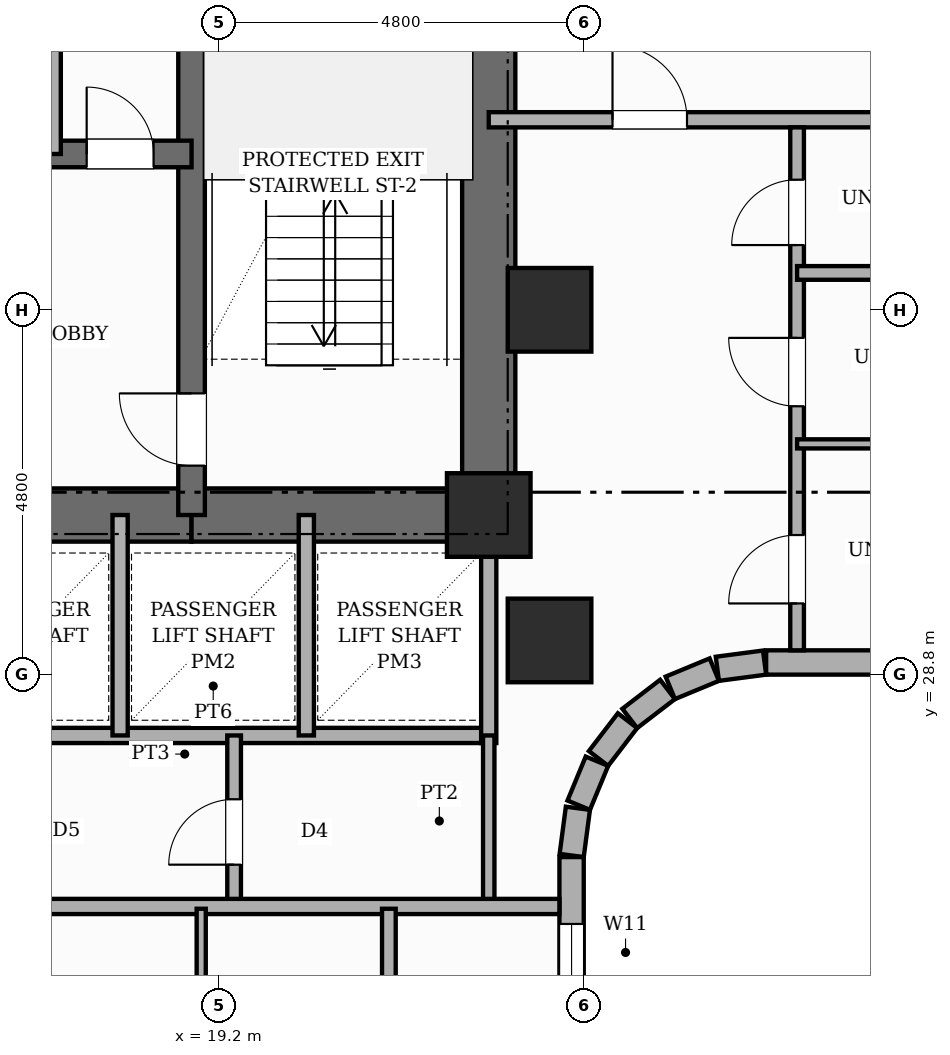
"""IFC4 building model, lengths in metres.
Left out: names, types, materials, properties, quantities, classifications, styles, units other than length and angle.
Written with IfcOpenShell. Run it as: python <this file> out.ifc"""

import sys

from ifc_helpers import new_model, si_unit, direction, frame, frame_2d, origin, origin_2d, place, context, subcontext, project, spatial, rectangle, extrude, element, fill, save


model = new_model("IFC4")
c1 = context("Model", 3, precision=1e-05, world=origin(), true_north=direction((0.0, 1.0)))
c2 = subcontext(c1, "Body", "Model", "MODEL_VIEW")
j1 = project(units=[si_unit("LENGTHUNIT", "METRE"), si_unit("PLANEANGLEUNIT", "RADIAN")], contexts=[c1])
p1 = place(None, origin())
s1 = spatial("IfcSite", under=j1, at=p1, CompositionType="ELEMENT")
p2 = place(p1, origin())
s2 = spatial("IfcBuilding", under=s1, at=p2, CompositionType="ELEMENT")
p3 = place(p2, frame((0.0, 0.0, 25.0)))
s3 = spatial("IfcBuildingStorey", under=s2, at=p3, CompositionType="ELEMENT", Elevation=25.0)
p4 = place(p3, frame((22.75, 30.55, 0.0), z_axis=(0.0, 0.0, 1.0), x_axis=(0.0, 1.0, 0.0)))
e1 = element("IfcWall", 1, at=p4, inside=s3, PredefinedType="SHEAR", context=c2, shape_type="SweptSolid", body=[
    extrude(rectangle(XDim=15.6, YDim=0.7, at=frame_2d((7.8, 0.0))), origin(), (0.0, 0.0, 1.0), 3.6),
])
p5 = place(p4, frame((10.8, 0.0, 0.0)))
e2 = element("IfcOpeningElement", 2, at=p5, cuts=e1, PredefinedType="OPENING", context=c2, shape_type="SweptSolid", body=[
    extrude(rectangle(XDim=1.0, YDim=2.15, at=frame_2d((0.5, 1.075))), frame((0.0, 0.36, 0.0), z_axis=(0.0, -1.0, 0.0), x_axis=(1.0, 0.0, 0.0)), (0.0, 0.0, 1.0), 0.72),
])
p6 = place(p3, frame((9.96, 30.9, 0.0), z_axis=(0.0, 0.0, 1.0), x_axis=(1.0, 0.0, 0.0)))
e3 = element("IfcWall", 3, at=p6, inside=s3, PredefinedType="SHEAR", context=c2, shape_type="SweptSolid", body=[
    extrude(rectangle(XDim=8.88, YDim=0.7, at=frame_2d((4.44, 0.0))), origin(), (0.0, 0.0, 1.0), 3.6),
])
p7 = place(p6, frame((4.09, 0.0, 0.0)))
e4 = element("IfcOpeningElement", 4, at=p7, cuts=e3, PredefinedType="OPENING", context=c2, shape_type="SweptSolid", body=[
    extrude(rectangle(XDim=1.0, YDim=2.15, at=frame_2d((0.5, 1.075))), frame((0.0, 0.36, 0.0), z_axis=(0.0, -1.0, 0.0), x_axis=(1.0, 0.0, 0.0)), (0.0, 0.0, 1.0), 0.72),
])
p8 = place(p3, frame((18.84, 30.9, 0.0), z_axis=(0.0, 0.0, 1.0), x_axis=(1.0, 0.0, 0.0)))
e5 = element("IfcWall", 5, at=p8, inside=s3, PredefinedType="SHEAR", context=c2, shape_type="SweptSolid", body=[
    extrude(rectangle(XDim=3.91, YDim=0.7, at=frame_2d((1.955, 0.0))), origin(), (0.0, 0.0, 1.0), 3.6),
])
p9 = place(p3, frame((18.84, 30.9, 0.0), z_axis=(0.0, 0.0, 1.0), x_axis=(0.0, 1.0, 0.0)))
e6 = element("IfcWall", 6, at=p9, inside=s3, PredefinedType="SHEAR", context=c2, shape_type="SweptSolid", body=[
    extrude(rectangle(XDim=14.9, YDim=0.35, at=frame_2d((7.45, 0.0))), origin(), (0.0, 0.0, 1.0), 3.6),
])
p10 = place(p9, frame((0.65, 0.0, 0.0)))
e7 = element("IfcOpeningElement", 7, at=p10, cuts=e6, PredefinedType="OPENING", context=c2, shape_type="SweptSolid", body=[
    extrude(rectangle(XDim=0.95, YDim=2.1, at=frame_2d((0.475, 1.05))), frame((0.0, 0.185, 0.0), z_axis=(0.0, -1.0, 0.0), x_axis=(1.0, 0.0, 0.0)), (0.0, 0.0, 1.0), 0.37),
])
p11 = place(p9, frame((10.45, 0.0, 0.0)))
e8 = element("IfcOpeningElement", 8, at=p11, cuts=e6, PredefinedType="OPENING", context=c2, shape_type="SweptSolid", body=[
    extrude(rectangle(XDim=1.0, YDim=2.15, at=frame_2d((0.5, 1.075))), frame((0.0, 0.185, 0.0), z_axis=(0.0, -1.0, 0.0), x_axis=(1.0, 0.0, 0.0)), (0.0, 0.0, 1.0), 0.37),
])
p12 = place(p3, frame((9.96, 35.65, 0.0), z_axis=(0.0, 0.0, 1.0), x_axis=(1.0, 0.0, 0.0)))
e9 = element("IfcWall", 9, at=p12, inside=s3, PredefinedType="SHEAR", context=c2, shape_type="SweptSolid", body=[
    extrude(rectangle(XDim=8.88, YDim=0.35, at=frame_2d((4.44, 0.0))), origin(), (0.0, 0.0, 1.0), 3.6),
])
p13 = place(p12, frame((0.84, 0.0, 0.0)))
e10 = element("IfcOpeningElement", 10, at=p13, cuts=e9, PredefinedType="OPENING", context=c2, shape_type="SweptSolid", body=[
    extrude(rectangle(XDim=1.1, YDim=2.15, at=frame_2d((0.55, 1.075))), frame((0.0, 0.185, 0.0), z_axis=(0.0, -1.0, 0.0), x_axis=(1.0, 0.0, 0.0)), (0.0, 0.0, 1.0), 0.37),
])
p14 = place(p12, frame((5.24, 0.0, 0.0)))
e11 = element("IfcOpeningElement", 11, at=p14, cuts=e9, PredefinedType="OPENING", context=c2, shape_type="SweptSolid", body=[
    extrude(rectangle(XDim=1.1, YDim=2.15, at=frame_2d((0.55, 1.075))), frame((0.0, 0.185, 0.0), z_axis=(0.0, -1.0, 0.0), x_axis=(1.0, 0.0, 0.0)), (0.0, 0.0, 1.0), 0.37),
])
p15 = place(p12, frame((7.5, 0.0, 0.0)))
e12 = element("IfcOpeningElement", 12, at=p15, cuts=e9, PredefinedType="OPENING", context=c2, shape_type="SweptSolid", body=[
    extrude(rectangle(XDim=0.88, YDim=2.1, at=frame_2d((0.44, 1.05))), frame((0.0, 0.185, 0.0), z_axis=(0.0, -1.0, 0.0), x_axis=(1.0, 0.0, 0.0)), (0.0, 0.0, 1.0), 0.37),
])
for number, where, z_axis, x_axis in (
    (13, (22.75, 30.9, 0.0), (0.0, 0.0, 1.0), (1.0, 0.0, 0.0)),
    (14, (23.55, 29.25, 0.0), (0.0, 0.0, 1.0), (1.0, 0.0, 0.0)),
    (15, (23.55, 33.6, 0.0), (0.0, 0.0, 1.0), (1.0, 0.0, 0.0)),
):
    element("IfcColumn", number, at=place(p3, frame(where, z_axis=z_axis, x_axis=x_axis)), inside=s3, PredefinedType="COLUMN", context=c2, shape_type="SweptSolid", body=[
        extrude(rectangle(XDim=1.1, YDim=1.1, at=origin_2d()), origin(), (0.0, 0.0, 1.0), 3.6),
    ])
p16 = place(p3, frame((55.2, 28.96, 0.0), z_axis=(0.0, 0.0, 1.0), x_axis=(-1.0, 0.0, 0.0)))
e16 = element("IfcWall", 16, at=p16, inside=s3, PredefinedType="STANDARD", context=c2, shape_type="SweptSolid", body=[
    extrude(rectangle(XDim=28.8, YDim=0.32, at=frame_2d((14.4, 0.0))), origin(), (0.0, 0.0, 1.0), 2.53),
])
p17 = place(p16, frame((24.115, 0.0, 0.65)))
e17 = element("IfcOpeningElement", 17, at=p17, cuts=e16, PredefinedType="OPENING", context=c2, shape_type="SweptSolid", body=[
    extrude(rectangle(XDim=1.4, YDim=1.1, at=frame_2d((0.7, 0.55))), frame((0.0, 0.17, 0.0), z_axis=(0.0, -1.0, 0.0), x_axis=(1.0, 0.0, 0.0)), (0.0, 0.0, 1.0), 0.34),
])
p18 = place(p16, frame((12.991, 0.0, 0.65)))
e18 = element("IfcOpeningElement", 18, at=p18, cuts=e16, PredefinedType="OPENING", context=c2, shape_type="SweptSolid", body=[
    extrude(rectangle(XDim=1.4, YDim=1.1, at=frame_2d((0.7, 0.55))), frame((0.0, 0.17, 0.0), z_axis=(0.0, -1.0, 0.0), x_axis=(1.0, 0.0, 0.0)), (0.0, 0.0, 1.0), 0.34),
])
p19 = place(p16, frame((19.869, 0.0, 0.45)))
e19 = element("IfcOpeningElement", 19, at=p19, cuts=e16, PredefinedType="OPENING", context=c2, shape_type="SweptSolid", body=[
    extrude(rectangle(XDim=0.95, YDim=1.8, at=frame_2d((0.475, 0.9))), frame((0.0, 0.17, 0.0), z_axis=(0.0, -1.0, 0.0), x_axis=(1.0, 0.0, 0.0)), (0.0, 0.0, 1.0), 0.34),
])
p20 = place(p16, frame((4.79, 0.0, 0.65)))
e20 = element("IfcOpeningElement", 20, at=p20, cuts=e16, PredefinedType="OPENING", context=c2, shape_type="SweptSolid", body=[
    extrude(rectangle(XDim=1.4, YDim=1.1, at=frame_2d((0.7, 0.55))), frame((0.0, 0.17, 0.0), z_axis=(0.0, -1.0, 0.0), x_axis=(1.0, 0.0, 0.0)), (0.0, 0.0, 1.0), 0.34),
])
p21 = place(p16, frame((0.47, 0.0, 0.65)))
e21 = element("IfcOpeningElement", 21, at=p21, cuts=e16, PredefinedType="OPENING", context=c2, shape_type="SweptSolid", body=[
    extrude(rectangle(XDim=1.4, YDim=1.1, at=frame_2d((0.7, 0.55))), frame((0.0, 0.17, 0.0), z_axis=(0.0, -1.0, 0.0), x_axis=(1.0, 0.0, 0.0)), (0.0, 0.0, 1.0), 0.34),
])
p22 = place(p16, frame((15.046, 0.0, 0.45)))
e22 = element("IfcOpeningElement", 22, at=p22, cuts=e16, PredefinedType="OPENING", context=c2, shape_type="SweptSolid", body=[
    extrude(rectangle(XDim=0.95, YDim=1.8, at=frame_2d((0.475, 0.9))), frame((0.0, 0.17, 0.0), z_axis=(0.0, -1.0, 0.0), x_axis=(1.0, 0.0, 0.0)), (0.0, 0.0, 1.0), 0.34),
])
p23 = place(p3, frame((26.379, 28.958, 0.0), z_axis=(0.0, 0.0, 1.0), x_axis=(-0.991447664465, -0.130504898859, 0.0)))
e23 = element("IfcWall", 23, at=p23, inside=s3, PredefinedType="STANDARD", context=c2, shape_type="SweptSolid", body=[
    extrude(rectangle(XDim=0.627, YDim=0.32, at=frame_2d((0.313, 0.0))), origin(), (0.0, 0.0, 1.0), 2.53),
])
p24 = place(p3, frame((25.718, 28.866, 0.0), z_axis=(0.0, 0.0, 1.0), x_axis=(-0.923836271867, -0.382787856107, 0.0)))
e24 = element("IfcWall", 24, at=p24, inside=s3, PredefinedType="STANDARD", context=c2, shape_type="SweptSolid", body=[
    extrude(rectangle(XDim=0.626, YDim=0.32, at=frame_2d((0.313, 0.0))), origin(), (0.0, 0.0, 1.0), 3.35),
])
for number, where, z_axis, x_axis in (
    (25, (25.103, 28.605, 0.0), (0.0, 0.0, 1.0), (-0.793, -0.609, 0.0)),
    (26, (24.576, 28.195, 0.0), (0.0, 0.0, 1.0), (-0.609, -0.793, 0.0)),
):
    element("IfcWall", number, at=place(p3, frame(where, z_axis=z_axis, x_axis=x_axis)), inside=s3, PredefinedType="STANDARD", context=c2, shape_type="SweptSolid", body=[
        extrude(rectangle(XDim=0.626, YDim=0.32, at=frame_2d((0.313, 0.0))), origin(), (0.0, 0.0, 1.0), 3.35),
    ])
p25 = place(p3, frame((24.174, 27.661, 0.0), z_axis=(0.0, 0.0, 1.0), x_axis=(-0.382455093999, -0.923974080304, 0.0)))
e27 = element("IfcWall", 27, at=p25, inside=s3, PredefinedType="STANDARD", context=c2, shape_type="SweptSolid", body=[
    extrude(rectangle(XDim=0.626, YDim=0.32, at=frame_2d((0.313, 0.0))), origin(), (0.0, 0.0, 1.0), 3.35),
])
p26 = place(p3, frame((23.923, 27.042, 0.0), z_axis=(0.0, 0.0, 1.0), x_axis=(-0.130555323746, -0.9914410257, 0.0)))
e28 = element("IfcWall", 28, at=p26, inside=s3, PredefinedType="STANDARD", context=c2, shape_type="SweptSolid", body=[
    extrude(rectangle(XDim=0.626, YDim=0.32, at=frame_2d((0.313, 0.0))), origin(), (0.0, 0.0, 1.0), 2.53),
])
p27 = place(p3, frame((23.84, 26.4, 0.0), z_axis=(0.0, 0.0, 1.0), x_axis=(0.0, -1.0, 0.0)))
e29 = element("IfcWall", 29, at=p27, inside=s3, PredefinedType="STANDARD", context=c2, shape_type="SweptSolid", body=[
    extrude(rectangle(XDim=19.2, YDim=0.32, at=frame_2d((9.6, 0.0))), origin(), (0.0, 0.0, 1.0), 2.53),
])
p28 = place(p27, frame((15.04, 0.0, 0.45)))
e30 = element("IfcOpeningElement", 30, at=p28, cuts=e29, PredefinedType="OPENING", context=c2, shape_type="SweptSolid", body=[
    extrude(rectangle(XDim=0.95, YDim=1.8, at=frame_2d((0.475, 0.9))), frame((0.0, 0.17, 0.0), z_axis=(0.0, -1.0, 0.0), x_axis=(1.0, 0.0, 0.0)), (0.0, 0.0, 1.0), 0.34),
])
p29 = place(p27, frame((8.22, 0.0, 0.65)))
e31 = element("IfcOpeningElement", 31, at=p29, cuts=e29, PredefinedType="OPENING", context=c2, shape_type="SweptSolid", body=[
    extrude(rectangle(XDim=1.4, YDim=1.1, at=frame_2d((0.7, 0.55))), frame((0.0, 0.17, 0.0), z_axis=(0.0, -1.0, 0.0), x_axis=(1.0, 0.0, 0.0)), (0.0, 0.0, 1.0), 0.34),
])
p30 = place(p27, frame((4.795, 0.0, 0.65)))
e32 = element("IfcOpeningElement", 32, at=p30, cuts=e29, PredefinedType="OPENING", context=c2, shape_type="SweptSolid", body=[
    extrude(rectangle(XDim=1.4, YDim=1.1, at=frame_2d((0.7, 0.55))), frame((0.0, 0.17, 0.0), z_axis=(0.0, -1.0, 0.0), x_axis=(1.0, 0.0, 0.0)), (0.0, 0.0, 1.0), 0.34),
])
p31 = place(p27, frame((10.26, 0.0, 0.45)))
e33 = element("IfcOpeningElement", 33, at=p31, cuts=e29, PredefinedType="OPENING", context=c2, shape_type="SweptSolid", body=[
    extrude(rectangle(XDim=0.95, YDim=1.8, at=frame_2d((0.475, 0.9))), frame((0.0, 0.17, 0.0), z_axis=(0.0, -1.0, 0.0), x_axis=(1.0, 0.0, 0.0)), (0.0, 0.0, 1.0), 0.34),
])
p32 = place(p27, frame((0.88, 0.0, 0.45)))
e34 = element("IfcOpeningElement", 34, at=p32, cuts=e29, PredefinedType="OPENING", context=c2, shape_type="SweptSolid", body=[
    extrude(rectangle(XDim=0.75, YDim=1.8, at=frame_2d((0.375, 0.9))), frame((0.0, 0.17, 0.0), z_axis=(0.0, -1.0, 0.0), x_axis=(1.0, 0.0, 0.0)), (0.0, 0.0, 1.0), 0.34),
])
p33 = place(p3, frame((17.02, 35.65, 0.0), z_axis=(0.0, 0.0, 1.0), x_axis=(0.0, 1.0, 0.0)))
e35 = element("IfcWall", 35, at=p33, inside=s3, PredefinedType="POLYGONAL", context=c2, shape_type="SweptSolid", body=[
    extrude(rectangle(XDim=5.15, YDim=0.2, at=frame_2d((2.575, 0.0))), origin(), (0.0, 0.0, 1.0), 3.35),
])
p34 = place(p3, frame((15.5, 28.0, 0.0), z_axis=(0.0, 0.0, 1.0), x_axis=(1.0, 0.0, 0.0)))
e36 = element("IfcWall", 36, at=p34, inside=s3, PredefinedType="POLYGONAL", context=c2, shape_type="SweptSolid", body=[
    extrude(rectangle(XDim=7.25, YDim=0.2, at=frame_2d((3.625, 0.0))), origin(), (0.0, 0.0, 1.0), 3.35),
])
p35 = place(p3, frame((22.75, 27.9, 0.0), z_axis=(0.0, 0.0, 1.0), x_axis=(0.0, 1.0, 0.0)))
e37 = element("IfcWall", 37, at=p35, inside=s3, PredefinedType="POLYGONAL", context=c2, shape_type="SweptSolid", body=[
    extrude(rectangle(XDim=3.0, YDim=0.2, at=frame_2d((1.5, 0.0))), origin(), (0.0, 0.0, 1.0), 3.35),
])
for number, where, z_axis, x_axis in (
    (38, (17.9, 28.0, 0.0), (0.0, 0.0, 1.0), (0.0, 1.0, 0.0)),
    (39, (20.35, 28.0, 0.0), (0.0, 0.0, 1.0), (0.0, 1.0, 0.0)),
):
    element("IfcWall", number, at=place(p3, frame(where, z_axis=z_axis, x_axis=x_axis)), inside=s3, PredefinedType="POLYGONAL", context=c2, shape_type="SweptSolid", body=[
        extrude(rectangle(XDim=2.9, YDim=0.2, at=frame_2d((1.45, 0.0))), origin(), (0.0, 0.0, 1.0), 3.35),
    ])
p36 = place(p3, frame((22.75, 25.75, 0.0), z_axis=(0.0, 0.0, 1.0), x_axis=(0.0, 1.0, 0.0)))
e40 = element("IfcWall", 40, at=p36, inside=s3, PredefinedType="PARTITIONING", context=c2, shape_type="SweptSolid", body=[
    extrude(rectangle(XDim=2.25, YDim=0.15, at=frame_2d((1.125, 0.0))), origin(), (0.0, 0.0, 1.0), 3.35),
])
p37 = place(p3, frame((19.4, 25.75, 0.0), z_axis=(0.0, 0.0, 1.0), x_axis=(0.0, 1.0, 0.0)))
e41 = element("IfcWall", 41, at=p37, inside=s3, PredefinedType="PLUMBINGWALL", context=c2, shape_type="SweptSolid", body=[
    extrude(rectangle(XDim=2.25, YDim=0.18, at=frame_2d((1.125, 0.0))), origin(), (0.0, 0.0, 1.0), 3.35),
])
p38 = place(p37, frame((0.55, 0.0, 0.0)))
e42 = element("IfcOpeningElement", 42, at=p38, cuts=e41, PredefinedType="OPENING", context=c2, shape_type="SweptSolid", body=[
    extrude(rectangle(XDim=0.86, YDim=2.1, at=frame_2d((0.43, 1.05))), frame((0.0, 0.1, 0.0), z_axis=(0.0, -1.0, 0.0), x_axis=(1.0, 0.0, 0.0)), (0.0, 0.0, 1.0), 0.2),
])
p39 = place(p3, frame((15.45, 25.75, 0.0), z_axis=(0.0, 0.0, 1.0), x_axis=(1.0, 0.0, 0.0)))
e43 = element("IfcWall", 43, at=p39, inside=s3, PredefinedType="PARTITIONING", context=c2, shape_type="SweptSolid", body=[
    extrude(rectangle(XDim=8.23, YDim=0.2, at=frame_2d((4.115, 0.0))), origin(), (0.0, 0.0, 1.0), 3.35),
])
p40 = place(p3, frame((18.967, 22.04, 0.0), z_axis=(0.0, 0.0, 1.0), x_axis=(0.0, 1.0, 0.0)))
e44 = element("IfcWall", 44, at=p40, inside=s3, PredefinedType="PARTITIONING", context=c2, shape_type="SweptSolid", body=[
    extrude(rectangle(XDim=3.68, YDim=0.12, at=frame_2d((1.84, 0.0))), origin(), (0.0, 0.0, 1.0), 3.35),
])
p41 = place(p3, frame((21.436, 22.04, 0.0), z_axis=(0.0, 0.0, 1.0), x_axis=(0.0, 1.0, 0.0)))
e45 = element("IfcWall", 45, at=p41, inside=s3, PredefinedType="PLUMBINGWALL", context=c2, shape_type="SweptSolid", body=[
    extrude(rectangle(XDim=3.68, YDim=0.18, at=frame_2d((1.84, 0.0))), origin(), (0.0, 0.0, 1.0), 3.35),
])
p42 = place(p3, frame((22.75, 36.1, 0.0), z_axis=(0.0, 0.0, 1.0), x_axis=(1.0, 0.0, 0.0)))
e46 = element("IfcWall", 46, at=p42, inside=s3, PredefinedType="PARTITIONING", context=c2, shape_type="SweptSolid", body=[
    extrude(rectangle(XDim=21.27, YDim=0.2, at=frame_2d((10.635, 0.0))), origin(), (0.0, 0.0, 1.0), 3.35),
])
p43 = place(p42, frame((1.628, 0.0, 0.0)))
e47 = element("IfcOpeningElement", 47, at=p43, cuts=e46, PredefinedType="OPENING", context=c2, shape_type="SweptSolid", body=[
    extrude(rectangle(XDim=0.98, YDim=2.18, at=frame_2d((0.49, 1.09))), frame((0.0, 0.11, 0.0), z_axis=(0.0, -1.0, 0.0), x_axis=(1.0, 0.0, 0.0)), (0.0, 0.0, 1.0), 0.22),
])
p44 = place(p42, frame((14.725, 0.0, 0.0)))
e48 = element("IfcOpeningElement", 48, at=p44, cuts=e46, PredefinedType="OPENING", context=c2, shape_type="SweptSolid", body=[
    extrude(rectangle(XDim=0.98, YDim=2.18, at=frame_2d((0.49, 1.09))), frame((0.0, 0.11, 0.0), z_axis=(0.0, -1.0, 0.0), x_axis=(1.0, 0.0, 0.0)), (0.0, 0.0, 1.0), 0.22),
])
p45 = place(p3, frame((26.807, 29.12, 0.0), z_axis=(0.0, 0.0, 1.0), x_axis=(0.0, 1.0, 0.0)))
e49 = element("IfcWall", 49, at=p45, inside=s3, PredefinedType="PLUMBINGWALL", context=c2, shape_type="SweptSolid", body=[
    extrude(rectangle(XDim=6.88, YDim=0.18, at=frame_2d((3.44, 0.0))), origin(), (0.0, 0.0, 1.0), 3.35),
])
p46 = place(p45, frame((0.617, 0.0, 0.0)))
e50 = element("IfcOpeningElement", 50, at=p46, cuts=e49, PredefinedType="OPENING", context=c2, shape_type="SweptSolid", body=[
    extrude(rectangle(XDim=0.9, YDim=2.15, at=frame_2d((0.45, 1.075))), frame((0.0, 0.1, 0.0), z_axis=(0.0, -1.0, 0.0), x_axis=(1.0, 0.0, 0.0)), (0.0, 0.0, 1.0), 0.2),
])
p47 = place(p45, frame((3.21, 0.0, 0.0)))
e51 = element("IfcOpeningElement", 51, at=p47, cuts=e49, PredefinedType="OPENING", context=c2, shape_type="SweptSolid", body=[
    extrude(rectangle(XDim=0.9, YDim=2.15, at=frame_2d((0.45, 1.075))), frame((0.0, 0.1, 0.0), z_axis=(0.0, -1.0, 0.0), x_axis=(1.0, 0.0, 0.0)), (0.0, 0.0, 1.0), 0.2),
])
p48 = place(p45, frame((5.332, 0.0, 0.0)))
e52 = element("IfcOpeningElement", 52, at=p48, cuts=e49, PredefinedType="OPENING", context=c2, shape_type="SweptSolid", body=[
    extrude(rectangle(XDim=0.86, YDim=2.1, at=frame_2d((0.43, 1.05))), frame((0.0, 0.1, 0.0), z_axis=(0.0, -1.0, 0.0), x_axis=(1.0, 0.0, 0.0)), (0.0, 0.0, 1.0), 0.2),
])
p49 = place(p3, frame((26.807, 31.836, 0.0), z_axis=(0.0, 0.0, 1.0), x_axis=(1.0, 0.0, 0.0)))
e53 = element("IfcWall", 53, at=p49, inside=s3, PredefinedType="PARTITIONING", context=c2, shape_type="SweptSolid", body=[
    extrude(rectangle(XDim=4.593, YDim=0.12, at=frame_2d((2.296, 0.0))), origin(), (0.0, 0.0, 1.0), 3.35),
])
p50 = place(p3, frame((26.807, 34.085, 0.0), z_axis=(0.0, 0.0, 1.0), x_axis=(1.0, 0.0, 0.0)))
e54 = element("IfcWall", 54, at=p50, inside=s3, PredefinedType="PLUMBINGWALL", context=c2, shape_type="SweptSolid", body=[
    extrude(rectangle(XDim=4.593, YDim=0.18, at=frame_2d((2.296, 0.0))), origin(), (0.0, 0.0, 1.0), 3.35),
])
p51 = place(p32, origin())
e55 = element("IfcWindow", 55, at=p51, inside=s3, PartitioningType="SINGLE_PANEL", PredefinedType="WINDOW", context=c2, shape_type="SweptSolid", body=[
    extrude(rectangle(XDim=0.75, YDim=1.8, at=frame_2d((0.375, 0.9))), frame((0.0, 0.03, 0.0), z_axis=(0.0, -1.0, 0.0), x_axis=(1.0, 0.0, 0.0)), (0.0, 0.0, 1.0), 0.06),
])
fill(e34, e55)
p52 = place(p10, origin())
e56 = element("IfcDoor", 56, at=p52, inside=s3, OperationType="SINGLE_SWING_RIGHT", PredefinedType="DOOR", context=c2, shape_type="SweptSolid", body=[
    extrude(rectangle(XDim=0.95, YDim=2.1, at=frame_2d((0.475, 1.05))), frame((0.0, 0.025, 0.0), z_axis=(0.0, -1.0, 0.0), x_axis=(1.0, 0.0, 0.0)), (0.0, 0.0, 1.0), 0.05),
])
fill(e7, e56)
p53 = place(p15, origin())
e57 = element("IfcDoor", 57, at=p53, inside=s3, OperationType="SINGLE_SWING_LEFT", PredefinedType="DOOR", context=c2, shape_type="SweptSolid", body=[
    extrude(rectangle(XDim=0.88, YDim=2.1, at=frame_2d((0.44, 1.05))), frame((0.0, 0.025, 0.0), z_axis=(0.0, -1.0, 0.0), x_axis=(1.0, 0.0, 0.0)), (0.0, 0.0, 1.0), 0.05),
])
fill(e12, e57)
p54 = place(p38, origin())
e58 = element("IfcDoor", 58, at=p54, inside=s3, OperationType="SINGLE_SWING_LEFT", PredefinedType="DOOR", context=c2, shape_type="SweptSolid", body=[
    extrude(rectangle(XDim=0.86, YDim=2.1, at=frame_2d((0.43, 1.05))), frame((0.0, 0.025, 0.0), z_axis=(0.0, -1.0, 0.0), x_axis=(1.0, 0.0, 0.0)), (0.0, 0.0, 1.0), 0.05),
])
fill(e42, e58)
p55 = place(p43, origin())
e59 = element("IfcDoor", 59, at=p55, inside=s3, OperationType="SINGLE_SWING_LEFT", PredefinedType="DOOR", context=c2, shape_type="SweptSolid", body=[
    extrude(rectangle(XDim=0.98, YDim=2.18, at=frame_2d((0.49, 1.09))), frame((0.0, 0.025, 0.0), z_axis=(0.0, -1.0, 0.0), x_axis=(1.0, 0.0, 0.0)), (0.0, 0.0, 1.0), 0.05),
])
fill(e47, e59)
p56 = place(p46, origin())
e60 = element("IfcDoor", 60, at=p56, inside=s3, OperationType="SINGLE_SWING_LEFT", PredefinedType="DOOR", context=c2, shape_type="SweptSolid", body=[
    extrude(rectangle(XDim=0.9, YDim=2.15, at=frame_2d((0.45, 1.075))), frame((0.0, 0.025, 0.0), z_axis=(0.0, -1.0, 0.0), x_axis=(1.0, 0.0, 0.0)), (0.0, 0.0, 1.0), 0.05),
])
fill(e50, e60)
p57 = place(p47, origin())
e61 = element("IfcDoor", 61, at=p57, inside=s3, OperationType="SINGLE_SWING_RIGHT", PredefinedType="DOOR", context=c2, shape_type="SweptSolid", body=[
    extrude(rectangle(XDim=0.9, YDim=2.15, at=frame_2d((0.45, 1.075))), frame((0.0, 0.025, 0.0), z_axis=(0.0, -1.0, 0.0), x_axis=(1.0, 0.0, 0.0)), (0.0, 0.0, 1.0), 0.05),
])
fill(e51, e61)
p58 = place(p48, origin())
e62 = element("IfcDoor", 62, at=p58, inside=s3, OperationType="SINGLE_SWING_LEFT", PredefinedType="DOOR", context=c2, shape_type="SweptSolid", body=[
    extrude(rectangle(XDim=0.86, YDim=2.1, at=frame_2d((0.43, 1.05))), frame((0.0, 0.025, 0.0), z_axis=(0.0, -1.0, 0.0), x_axis=(1.0, 0.0, 0.0)), (0.0, 0.0, 1.0), 0.05),
])
fill(e52, e62)
save(model, sys.argv[1])
